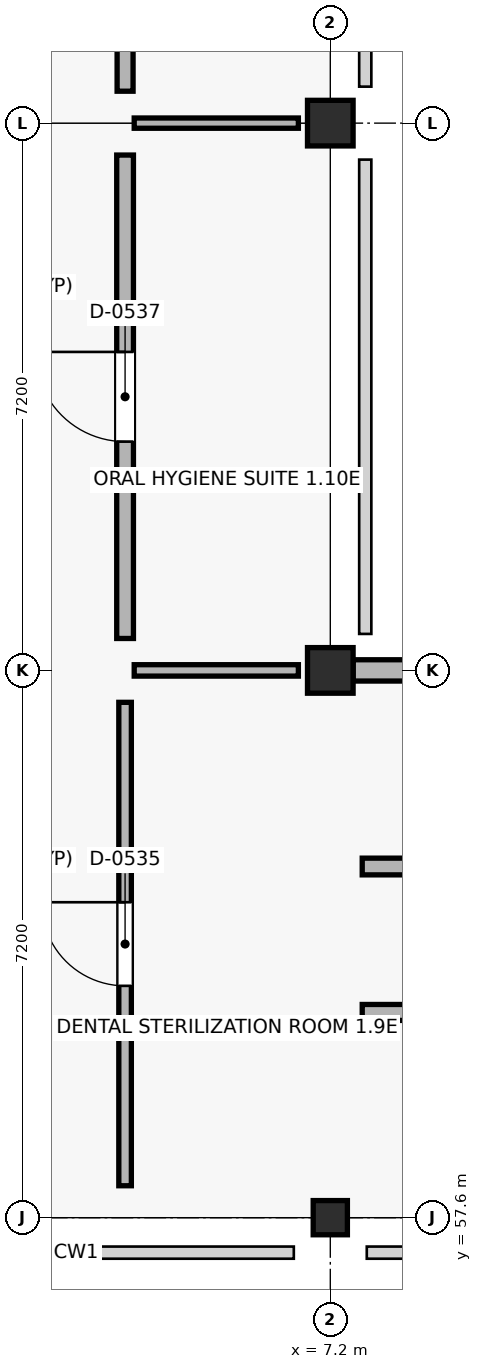
"""IFC4 building model, lengths in metres.
Left out: names, types, materials, properties, quantities, classifications, styles, units other than length and angle.
Written with IfcOpenShell. Run it as: python <this file> out.ifc"""

import sys

from ifc_helpers import new_model, si_unit, direction, frame, frame_2d, origin, origin_2d, place, context, subcontext, project, spatial, rectangle, extrude, element, fill, save


model = new_model("IFC4")
c1 = context("Model", 3, precision=1e-05, world=origin(), true_north=direction((0.0, 1.0)))
c2 = subcontext(c1, "Body", "Model", "MODEL_VIEW")
j1 = project(units=[si_unit("LENGTHUNIT", "METRE"), si_unit("PLANEANGLEUNIT", "RADIAN")], contexts=[c1])
p1 = place(None, origin())
s1 = spatial("IfcSite", under=j1, at=p1, CompositionType="ELEMENT")
p2 = place(p1, origin())
s2 = spatial("IfcBuilding", under=s1, at=p2, CompositionType="ELEMENT")
p3 = place(p2, frame((0.0, 0.0, 13.5)))
s3 = spatial("IfcBuildingStorey", under=s2, at=p3, CompositionType="ELEMENT", Elevation=13.5)
p4 = place(p3, frame((7.2, 57.6, 0.0), z_axis=(0.0, 0.0, 1.0), x_axis=(1.0, 0.0, 0.0)))
e1 = element("IfcColumn", 1, at=p4, inside=s3, PredefinedType="COLUMN", context=c2, shape_type="SweptSolid", body=[
    extrude(rectangle(XDim=0.45, YDim=0.45, at=origin_2d()), origin(), (0.0, 0.0, 1.0), 3.83),
])
for number, where, z_axis, x_axis in (
    (2, (7.2, 64.8, 0.0), (0.0, 0.0, 1.0), (1.0, 0.0, 0.0)),
    (3, (7.2, 72.0, 0.0), (0.0, 0.0, 1.0), (1.0, 0.0, 0.0)),
):
    element("IfcColumn", number, at=place(p3, frame(where, z_axis=z_axis, x_axis=x_axis)), inside=s3, PredefinedType="COLUMN", context=c2, shape_type="SweptSolid", body=[
        extrude(rectangle(XDim=0.6, YDim=0.6, at=origin_2d()), origin(), (0.0, 0.0, 1.0), 4.05),
    ])
p5 = place(p3, frame((14.175, 64.8, 0.0), z_axis=(0.0, 0.0, 1.0), x_axis=(-1.0, 0.0, 0.0)))
e4 = element("IfcWall", 4, at=p5, inside=s3, PredefinedType="STANDARD", context=c2, shape_type="SweptSolid", body=[
    extrude(rectangle(XDim=6.675, YDim=0.28, at=frame_2d((3.337, 0.0))), origin(), (0.0, 0.0, 1.0), 3.14),
])
p6 = place(p5, frame((1.15, 0.0, 0.9)))
e5 = element("IfcOpeningElement", 5, at=p6, cuts=e4, PredefinedType="OPENING", context=c2, shape_type="SweptSolid", body=[
    extrude(rectangle(XDim=1.2, YDim=1.75, at=frame_2d((0.6, 0.875))), frame((0.0, 0.15, 0.0), z_axis=(0.0, -1.0, 0.0), x_axis=(1.0, 0.0, 0.0)), (0.0, 0.0, 1.0), 0.3),
])
p7 = place(p5, frame((4.325, 0.0, 0.9)))
e6 = element("IfcOpeningElement", 6, at=p7, cuts=e4, PredefinedType="OPENING", context=c2, shape_type="SweptSolid", body=[
    extrude(rectangle(XDim=1.2, YDim=1.75, at=frame_2d((0.6, 0.875))), frame((0.0, 0.15, 0.0), z_axis=(0.0, -1.0, 0.0), x_axis=(1.0, 0.0, 0.0)), (0.0, 0.0, 1.0), 0.3),
])
p8 = place(p3, frame((4.5, 58.02, 0.0), z_axis=(0.0, 0.0, 1.0), x_axis=(0.0, 1.0, 0.0)))
e7 = element("IfcWall", 7, at=p8, inside=s3, PredefinedType="PARTITIONING", context=c2, shape_type="SweptSolid", body=[
    extrude(rectangle(XDim=6.36, YDim=0.165, at=frame_2d((3.18, 0.0))), origin(), (0.0, 0.0, 1.0), 2.93),
])
p9 = place(p8, frame((2.63, 0.0, 0.0)))
e8 = element("IfcOpeningElement", 8, at=p9, cuts=e7, PredefinedType="OPENING", context=c2, shape_type="SweptSolid", body=[
    extrude(rectangle(XDim=1.1, YDim=2.14, at=frame_2d((0.55, 1.07))), frame((0.0, 0.093, 0.0), z_axis=(0.0, -1.0, 0.0), x_axis=(1.0, 0.0, 0.0)), (0.0, 0.0, 1.0), 0.185),
])
p10 = place(p3, frame((4.62, 64.8, 0.0), z_axis=(0.0, 0.0, 1.0), x_axis=(1.0, 0.0, 0.0)))
e9 = element("IfcWall", 9, at=p10, inside=s3, PredefinedType="PARTITIONING", context=c2, shape_type="SweptSolid", body=[
    extrude(rectangle(XDim=2.16, YDim=0.15, at=frame_2d((1.08, 0.0))), origin(), (0.0, 0.0, 1.0), 2.93),
])
p11 = place(p3, frame((4.5, 65.22, 0.0), z_axis=(0.0, 0.0, 1.0), x_axis=(0.0, 1.0, 0.0)))
e10 = element("IfcWall", 10, at=p11, inside=s3, PredefinedType="SOLIDWALL", context=c2, shape_type="SweptSolid", body=[
    extrude(rectangle(XDim=6.36, YDim=0.22, at=frame_2d((3.18, 0.0))), origin(), (0.0, 0.0, 1.0), 2.93),
])
p12 = place(p11, frame((2.59, 0.0, 0.0)))
e11 = element("IfcOpeningElement", 11, at=p12, cuts=e10, PredefinedType="OPENING", context=c2, shape_type="SweptSolid", body=[
    extrude(rectangle(XDim=1.18, YDim=2.14, at=frame_2d((0.59, 1.07))), frame((0.0, 0.12, 0.0), z_axis=(0.0, -1.0, 0.0), x_axis=(1.0, 0.0, 0.0)), (0.0, 0.0, 1.0), 0.24),
])
p13 = place(p3, frame((4.62, 72.0, 0.0), z_axis=(0.0, 0.0, 1.0), x_axis=(1.0, 0.0, 0.0)))
e12 = element("IfcWall", 12, at=p13, inside=s3, PredefinedType="PARTITIONING", context=c2, shape_type="SweptSolid", body=[
    extrude(rectangle(XDim=2.16, YDim=0.135, at=frame_2d((1.08, 0.0))), origin(), (0.0, 0.0, 1.0), 2.93),
])
p14 = place(p3, frame((4.5, 72.42, 0.0), z_axis=(0.0, 0.0, 1.0), x_axis=(0.0, 1.0, 0.0)))
e13 = element("IfcWall", 13, at=p14, inside=s3, PredefinedType="PLUMBINGWALL", context=c2, shape_type="SweptSolid", body=[
    extrude(rectangle(XDim=6.36, YDim=0.21, at=frame_2d((3.18, 0.0))), origin(), (0.0, 0.0, 1.0), 2.93),
])
p15 = place(p14, frame((2.55, 0.0, 0.0)))
e14 = element("IfcOpeningElement", 14, at=p15, cuts=e13, PredefinedType="OPENING", context=c2, shape_type="SweptSolid", body=[
    extrude(rectangle(XDim=1.26, YDim=2.14, at=frame_2d((0.63, 1.07))), frame((0.0, 0.115, 0.0), z_axis=(0.0, -1.0, 0.0), x_axis=(1.0, 0.0, 0.0)), (0.0, 0.0, 1.0), 0.23),
])
p16 = place(p3, frame((7.62, 60.3, 0.0), z_axis=(0.0, 0.0, 1.0), x_axis=(1.0, 0.0, 0.0)))
e15 = element("IfcWall", 15, at=p16, inside=s3, PredefinedType="PLUMBINGWALL", context=c2, shape_type="SweptSolid", body=[
    extrude(rectangle(XDim=6.36, YDim=0.21, at=frame_2d((3.18, 0.0))), origin(), (0.0, 0.0, 1.0), 2.93),
])
p17 = place(p16, frame((2.71, 0.0, 0.0)))
e16 = element("IfcOpeningElement", 16, at=p17, cuts=e15, PredefinedType="OPENING", context=c2, shape_type="SweptSolid", body=[
    extrude(rectangle(XDim=0.94, YDim=2.19, at=frame_2d((0.47, 1.095))), frame((0.0, 0.115, 0.0), z_axis=(0.0, -1.0, 0.0), x_axis=(1.0, 0.0, 0.0)), (0.0, 0.0, 1.0), 0.23),
])
p18 = place(p3, frame((7.62, 62.22, 0.0), z_axis=(0.0, 0.0, 1.0), x_axis=(1.0, 0.0, 0.0)))
e17 = element("IfcWall", 17, at=p18, inside=s3, PredefinedType="SOLIDWALL", context=c2, shape_type="SweptSolid", body=[
    extrude(rectangle(XDim=6.36, YDim=0.22, at=frame_2d((3.18, 0.0))), origin(), (0.0, 0.0, 1.0), 2.93),
])
p19 = place(p18, frame((2.69, 0.0, 0.0)))
e18 = element("IfcOpeningElement", 18, at=p19, cuts=e17, PredefinedType="OPENING", context=c2, shape_type="SweptSolid", body=[
    extrude(rectangle(XDim=0.98, YDim=2.19, at=frame_2d((0.49, 1.095))), frame((0.0, 0.12, 0.0), z_axis=(0.0, -1.0, 0.0), x_axis=(1.0, 0.0, 0.0)), (0.0, 0.0, 1.0), 0.24),
])
p20 = place(p9, origin())
e19 = element("IfcDoor", 19, at=p20, inside=s3, OperationType="SINGLE_SWING_RIGHT", PredefinedType="DOOR", context=c2, shape_type="SweptSolid", body=[
    extrude(rectangle(XDim=1.1, YDim=2.14, at=frame_2d((0.55, 1.07))), frame((0.0, 0.025, 0.0), z_axis=(0.0, -1.0, 0.0), x_axis=(1.0, 0.0, 0.0)), (0.0, 0.0, 1.0), 0.05),
])
fill(e8, e19)
p21 = place(p12, origin())
e20 = element("IfcDoor", 20, at=p21, inside=s3, OperationType="SINGLE_SWING_RIGHT", PredefinedType="DOOR", context=c2, shape_type="SweptSolid", body=[
    extrude(rectangle(XDim=1.18, YDim=2.14, at=frame_2d((0.59, 1.07))), frame((0.0, 0.025, 0.0), z_axis=(0.0, -1.0, 0.0), x_axis=(1.0, 0.0, 0.0)), (0.0, 0.0, 1.0), 0.05),
])
fill(e11, e20)
save(model, sys.argv[1])
